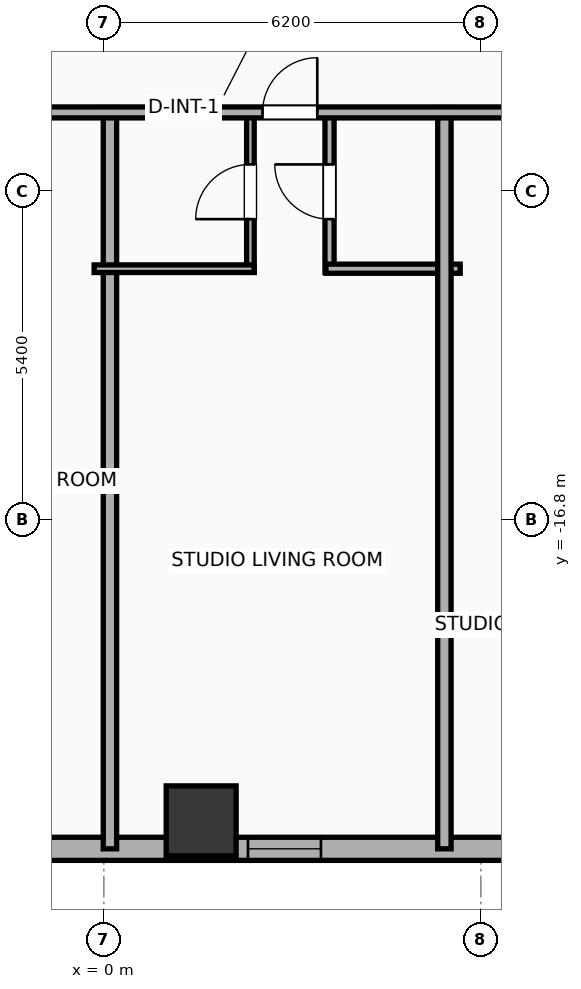
"""IFC4 building model, lengths in metres.
Left out: names, types, materials, properties, quantities, classifications, styles, units other than length and angle.
Written with IfcOpenShell. Run it as: python <this file> out.ifc"""

import sys

from ifc_helpers import new_model, si_unit, direction, frame, frame_2d, origin, origin_2d, place, context, subcontext, project, spatial, rectangle, hollow_rectangle, extrude, element, fill, save


model = new_model("IFC4")
c1 = context("Model", 3, precision=1e-05, world=origin(), true_north=direction((0.0, 1.0)))
c2 = subcontext(c1, "Body", "Model", "MODEL_VIEW")
j1 = project(units=[si_unit("LENGTHUNIT", "METRE"), si_unit("PLANEANGLEUNIT", "RADIAN")], contexts=[c1])
p1 = place(None, origin())
s1 = spatial("IfcSite", under=j1, at=p1, CompositionType="ELEMENT")
p2 = place(p1, origin())
s2 = spatial("IfcBuilding", under=s1, at=p2, CompositionType="ELEMENT")
p3 = place(p2, frame((0.0, 0.0, 41.6)))
s3 = spatial("IfcBuildingStorey", under=s2, at=p3, CompositionType="ELEMENT", Elevation=41.6)
p4 = place(p3, frame((1.6, -21.75, 0.0), z_axis=(0.0, 0.0, 1.0), x_axis=(1.0, 0.0, 0.0)))
e1 = element("IfcColumn", 1, at=p4, inside=s3, PredefinedType="COLUMN", context=c2, shape_type="SweptSolid", body=[
    extrude(hollow_rectangle(XDim=1.15, YDim=1.15, WallThickness=0.04, at=origin_2d()), origin(), (0.0, 0.0, 1.0), 3.9),
])
p5 = place(p3, frame((22.381, -22.21, 0.0), z_axis=(0.0, 0.0, 1.0), x_axis=(-1.0, 0.0, 0.0)))
e2 = element("IfcWall", 2, at=p5, inside=s3, PredefinedType="ELEMENTEDWALL", context=c2, shape_type="SweptSolid", body=[
    extrude(rectangle(XDim=51.963, YDim=0.38, at=frame_2d((25.981, 0.0))), origin(), (0.0, 0.0, 1.0), 3.65),
])
p6 = place(p5, frame((42.952, 0.0, 0.75)))
e3 = element("IfcOpeningElement", 3, at=p6, cuts=e2, PredefinedType="OPENING", context=c2, shape_type="SweptSolid", body=[
    extrude(rectangle(XDim=2.4, YDim=2.1, at=frame_2d((1.2, 1.05))), frame((0.0, 0.2, 0.0), z_axis=(0.0, -1.0, 0.0), x_axis=(1.0, 0.0, 0.0)), (0.0, 0.0, 1.0), 0.4),
])
p7 = place(p5, frame((49.847, 0.0, 0.75)))
e4 = element("IfcOpeningElement", 4, at=p7, cuts=e2, PredefinedType="OPENING", context=c2, shape_type="SweptSolid", body=[
    extrude(rectangle(XDim=1.2, YDim=2.05, at=frame_2d((0.6, 1.025))), frame((0.0, 0.2, 0.0), z_axis=(0.0, -1.0, 0.0), x_axis=(1.0, 0.0, 0.0)), (0.0, 0.0, 1.0), 0.4),
])
p8 = place(p5, frame((47.445, 0.0, 0.75)))
e5 = element("IfcOpeningElement", 5, at=p8, cuts=e2, PredefinedType="OPENING", context=c2, shape_type="SweptSolid", body=[
    extrude(rectangle(XDim=1.2, YDim=2.05, at=frame_2d((0.6, 1.025))), frame((0.0, 0.2, 0.0), z_axis=(0.0, -1.0, 0.0), x_axis=(1.0, 0.0, 0.0)), (0.0, 0.0, 1.0), 0.4),
])
p9 = place(p5, frame((39.526, 0.0, 0.75)))
e6 = element("IfcOpeningElement", 6, at=p9, cuts=e2, PredefinedType="OPENING", context=c2, shape_type="SweptSolid", body=[
    extrude(rectangle(XDim=1.2, YDim=2.05, at=frame_2d((0.6, 1.025))), frame((0.0, 0.2, 0.0), z_axis=(0.0, -1.0, 0.0), x_axis=(1.0, 0.0, 0.0)), (0.0, 0.0, 1.0), 0.4),
])
p10 = place(p5, frame((33.018, 0.0, 0.75)))
e7 = element("IfcOpeningElement", 7, at=p10, cuts=e2, PredefinedType="OPENING", context=c2, shape_type="SweptSolid", body=[
    extrude(rectangle(XDim=1.2, YDim=2.05, at=frame_2d((0.6, 1.025))), frame((0.0, 0.2, 0.0), z_axis=(0.0, -1.0, 0.0), x_axis=(1.0, 0.0, 0.0)), (0.0, 0.0, 1.0), 0.4),
])
p11 = place(p5, frame((36.813, 0.0, 0.75)))
e8 = element("IfcOpeningElement", 8, at=p11, cuts=e2, PredefinedType="OPENING", context=c2, shape_type="SweptSolid", body=[
    extrude(rectangle(XDim=1.2, YDim=2.05, at=frame_2d((0.6, 1.025))), frame((0.0, 0.2, 0.0), z_axis=(0.0, -1.0, 0.0), x_axis=(1.0, 0.0, 0.0)), (0.0, 0.0, 1.0), 0.4),
])
p12 = place(p5, frame((28.886, 0.0, 0.75)))
e9 = element("IfcOpeningElement", 9, at=p12, cuts=e2, PredefinedType="OPENING", context=c2, shape_type="SweptSolid", body=[
    extrude(rectangle(XDim=1.2, YDim=2.05, at=frame_2d((0.6, 1.025))), frame((0.0, 0.2, 0.0), z_axis=(0.0, -1.0, 0.0), x_axis=(1.0, 0.0, 0.0)), (0.0, 0.0, 1.0), 0.4),
])
p13 = place(p5, frame((23.306, 0.0, 0.75)))
e10 = element("IfcOpeningElement", 10, at=p13, cuts=e2, PredefinedType="OPENING", context=c2, shape_type="SweptSolid", body=[
    extrude(rectangle(XDim=1.2, YDim=2.05, at=frame_2d((0.6, 1.025))), frame((0.0, 0.2, 0.0), z_axis=(0.0, -1.0, 0.0), x_axis=(1.0, 0.0, 0.0)), (0.0, 0.0, 1.0), 0.4),
])
p14 = place(p5, frame((26.056, 0.0, 0.75)))
e11 = element("IfcOpeningElement", 11, at=p14, cuts=e2, PredefinedType="OPENING", context=c2, shape_type="SweptSolid", body=[
    extrude(rectangle(XDim=1.2, YDim=2.05, at=frame_2d((0.6, 1.025))), frame((0.0, 0.2, 0.0), z_axis=(0.0, -1.0, 0.0), x_axis=(1.0, 0.0, 0.0)), (0.0, 0.0, 1.0), 0.4),
])
p15 = place(p5, frame((18.811, 0.0, 0.75)))
e12 = element("IfcOpeningElement", 12, at=p15, cuts=e2, PredefinedType="OPENING", context=c2, shape_type="SweptSolid", body=[
    extrude(rectangle(XDim=1.2, YDim=2.05, at=frame_2d((0.6, 1.025))), frame((0.0, 0.2, 0.0), z_axis=(0.0, -1.0, 0.0), x_axis=(1.0, 0.0, 0.0)), (0.0, 0.0, 1.0), 0.4),
])
p16 = place(p5, frame((14.602, 0.0, 0.75)))
e13 = element("IfcOpeningElement", 13, at=p16, cuts=e2, PredefinedType="OPENING", context=c2, shape_type="SweptSolid", body=[
    extrude(rectangle(XDim=1.2, YDim=2.05, at=frame_2d((0.6, 1.025))), frame((0.0, 0.2, 0.0), z_axis=(0.0, -1.0, 0.0), x_axis=(1.0, 0.0, 0.0)), (0.0, 0.0, 1.0), 0.4),
])
p17 = place(p5, frame((11.852, 0.0, 0.75)))
e14 = element("IfcOpeningElement", 14, at=p17, cuts=e2, PredefinedType="OPENING", context=c2, shape_type="SweptSolid", body=[
    extrude(rectangle(XDim=1.2, YDim=2.05, at=frame_2d((0.6, 1.025))), frame((0.0, 0.2, 0.0), z_axis=(0.0, -1.0, 0.0), x_axis=(1.0, 0.0, 0.0)), (0.0, 0.0, 1.0), 0.4),
])
p18 = place(p5, frame((8.316, 0.0, 0.75)))
e15 = element("IfcOpeningElement", 15, at=p18, cuts=e2, PredefinedType="OPENING", context=c2, shape_type="SweptSolid", body=[
    extrude(rectangle(XDim=1.2, YDim=2.05, at=frame_2d((0.6, 1.025))), frame((0.0, 0.2, 0.0), z_axis=(0.0, -1.0, 0.0), x_axis=(1.0, 0.0, 0.0)), (0.0, 0.0, 1.0), 0.4),
])
p19 = place(p5, frame((6.286, 0.0, 0.75)))
e16 = element("IfcOpeningElement", 16, at=p19, cuts=e2, PredefinedType="OPENING", context=c2, shape_type="SweptSolid", body=[
    extrude(rectangle(XDim=1.2, YDim=2.05, at=frame_2d((0.6, 1.025))), frame((0.0, 0.2, 0.0), z_axis=(0.0, -1.0, 0.0), x_axis=(1.0, 0.0, 0.0)), (0.0, 0.0, 1.0), 0.4),
])
p20 = place(p5, frame((3.737, 0.0, 0.75)))
e17 = element("IfcOpeningElement", 17, at=p20, cuts=e2, PredefinedType="OPENING", context=c2, shape_type="SweptSolid", body=[
    extrude(rectangle(XDim=1.2, YDim=2.05, at=frame_2d((0.6, 1.025))), frame((0.0, 0.2, 0.0), z_axis=(0.0, -1.0, 0.0), x_axis=(1.0, 0.0, 0.0)), (0.0, 0.0, 1.0), 0.4),
])
p21 = place(p5, frame((1.291, 0.0, 0.75)))
e18 = element("IfcOpeningElement", 18, at=p21, cuts=e2, PredefinedType="OPENING", context=c2, shape_type="SweptSolid", body=[
    extrude(rectangle(XDim=1.2, YDim=2.05, at=frame_2d((0.6, 1.025))), frame((0.0, 0.2, 0.0), z_axis=(0.0, -1.0, 0.0), x_axis=(1.0, 0.0, 0.0)), (0.0, 0.0, 1.0), 0.4),
])
p22 = place(p3, frame((0.1, -22.21, 0.0), z_axis=(0.0, 0.0, 1.0), x_axis=(0.0, 1.0, 0.0)))
e19 = element("IfcWall", 19, at=p22, inside=s3, PredefinedType="PARTITIONING", context=c2, shape_type="SweptSolid", body=[
    extrude(rectangle(XDim=12.19, YDim=0.22, at=frame_2d((6.095, 0.0))), origin(), (0.0, 0.0, 1.0), 3.65),
])
p23 = place(p3, frame((2.41, -12.73, 0.0), z_axis=(0.0, 0.0, 1.0), x_axis=(0.0, 1.0, 0.0)))
e20 = element("IfcWall", 20, at=p23, inside=s3, PredefinedType="PARTITIONING", context=c2, shape_type="SweptSolid", body=[
    extrude(rectangle(XDim=2.65, YDim=0.125, at=frame_2d((1.325, 0.0))), origin(), (0.0, 0.0, 1.0), 3.65),
])
p24 = place(p23, frame((0.875, 0.0, 0.0)))
e21 = element("IfcOpeningElement", 21, at=p24, cuts=e20, PredefinedType="OPENING", context=c2, shape_type="SweptSolid", body=[
    extrude(rectangle(XDim=0.9, YDim=2.05, at=frame_2d((0.45, 1.025))), frame((0.0, 0.073, 0.0), z_axis=(0.0, -1.0, 0.0), x_axis=(1.0, 0.0, 0.0)), (0.0, 0.0, 1.0), 0.145),
])
p25 = place(p3, frame((3.711, -12.73, 0.0), z_axis=(0.0, 0.0, 1.0), x_axis=(0.0, 1.0, 0.0)))
e22 = element("IfcWall", 22, at=p25, inside=s3, PredefinedType="PLUMBINGWALL", context=c2, shape_type="SweptSolid", body=[
    extrude(rectangle(XDim=2.65, YDim=0.15, at=frame_2d((1.325, 0.0))), origin(), (0.0, 0.0, 1.0), 2.94),
])
p26 = place(p25, frame((0.875, 0.0, 0.0)))
e23 = element("IfcOpeningElement", 23, at=p26, cuts=e22, PredefinedType="OPENING", context=c2, shape_type="SweptSolid", body=[
    extrude(rectangle(XDim=0.9, YDim=2.05, at=frame_2d((0.45, 1.025))), frame((0.0, 0.085, 0.0), z_axis=(0.0, -1.0, 0.0), x_axis=(1.0, 0.0, 0.0)), (0.0, 0.0, 1.0), 0.17),
])
p27 = place(p3, frame((-0.16, -12.67, 0.0), z_axis=(0.0, 0.0, 1.0), x_axis=(1.0, 0.0, 0.0)))
e24 = element("IfcWall", 24, at=p27, inside=s3, PredefinedType="PARTITIONING", context=c2, shape_type="SweptSolid", body=[
    extrude(rectangle(XDim=2.63, YDim=0.125, at=frame_2d((1.315, 0.0))), origin(), (0.0, 0.0, 1.0), 3.65),
])
p28 = place(p3, frame((3.651, -12.67, 0.0), z_axis=(0.0, 0.0, 1.0), x_axis=(1.0, 0.0, 0.0)))
e25 = element("IfcWall", 25, at=p28, inside=s3, PredefinedType="PLUMBINGWALL", context=c2, shape_type="SweptSolid", body=[
    extrude(rectangle(XDim=2.209, YDim=0.15, at=frame_2d((1.104, 0.0))), origin(), (0.0, 0.0, 1.0), 3.65),
])
p29 = place(p3, frame((5.6, -22.21, 0.0), z_axis=(0.0, 0.0, 1.0), x_axis=(0.0, 1.0, 0.0)))
e26 = element("IfcWall", 26, at=p29, inside=s3, PredefinedType="PARTITIONING", context=c2, shape_type="SweptSolid", body=[
    extrude(rectangle(XDim=12.19, YDim=0.22, at=frame_2d((6.095, 0.0))), origin(), (0.0, 0.0, 1.0), 3.65),
])
p30 = place(p3, frame((-33.41, -10.1, 0.0), z_axis=(0.0, 0.0, 1.0), x_axis=(1.0, 0.0, 0.0)))
e27 = element("IfcWall", 27, at=p30, inside=s3, PredefinedType="PARTITIONING", context=c2, shape_type="SweptSolid", body=[
    extrude(rectangle(XDim=59.62, YDim=0.18, at=frame_2d((29.81, 0.0))), origin(), (0.0, 0.0, 1.0), 3.65),
])
p31 = place(p30, frame((2.746, 0.0, 0.0)))
e28 = element("IfcOpeningElement", 28, at=p31, cuts=e27, PredefinedType="OPENING", context=c2, shape_type="SweptSolid", body=[
    extrude(rectangle(XDim=0.9, YDim=2.05, at=frame_2d((0.45, 1.025))), frame((0.0, 0.1, 0.0), z_axis=(0.0, -1.0, 0.0), x_axis=(1.0, 0.0, 0.0)), (0.0, 0.0, 1.0), 0.2),
])
p32 = place(p30, frame((11.552, 0.0, 0.0)))
e29 = element("IfcOpeningElement", 29, at=p32, cuts=e27, PredefinedType="OPENING", context=c2, shape_type="SweptSolid", body=[
    extrude(rectangle(XDim=1.15, YDim=2.05, at=frame_2d((0.575, 1.025))), frame((0.0, 0.1, 0.0), z_axis=(0.0, -1.0, 0.0), x_axis=(1.0, 0.0, 0.0)), (0.0, 0.0, 1.0), 0.2),
])
p33 = place(p30, frame((22.379, 0.0, 0.0)))
e30 = element("IfcOpeningElement", 30, at=p33, cuts=e27, PredefinedType="OPENING", context=c2, shape_type="SweptSolid", body=[
    extrude(rectangle(XDim=1.15, YDim=2.05, at=frame_2d((0.575, 1.025))), frame((0.0, 0.1, 0.0), z_axis=(0.0, -1.0, 0.0), x_axis=(1.0, 0.0, 0.0)), (0.0, 0.0, 1.0), 0.2),
])
p34 = place(p30, frame((31.28, 0.0, 0.0)))
e31 = element("IfcOpeningElement", 31, at=p34, cuts=e27, PredefinedType="OPENING", context=c2, shape_type="SweptSolid", body=[
    extrude(rectangle(XDim=1.15, YDim=2.05, at=frame_2d((0.575, 1.025))), frame((0.0, 0.1, 0.0), z_axis=(0.0, -1.0, 0.0), x_axis=(1.0, 0.0, 0.0)), (0.0, 0.0, 1.0), 0.2),
])
p35 = place(p30, frame((36.02, 0.0, 0.0)))
e32 = element("IfcOpeningElement", 32, at=p35, cuts=e27, PredefinedType="OPENING", context=c2, shape_type="SweptSolid", body=[
    extrude(rectangle(XDim=0.9, YDim=2.05, at=frame_2d((0.45, 1.025))), frame((0.0, 0.1, 0.0), z_axis=(0.0, -1.0, 0.0), x_axis=(1.0, 0.0, 0.0)), (0.0, 0.0, 1.0), 0.2),
])
p36 = place(p30, frame((40.044, 0.0, 0.0)))
e33 = element("IfcOpeningElement", 33, at=p36, cuts=e27, PredefinedType="OPENING", context=c2, shape_type="SweptSolid", body=[
    extrude(rectangle(XDim=1.15, YDim=2.05, at=frame_2d((0.575, 1.025))), frame((0.0, 0.1, 0.0), z_axis=(0.0, -1.0, 0.0), x_axis=(1.0, 0.0, 0.0)), (0.0, 0.0, 1.0), 0.2),
])
p37 = place(p30, frame((45.613, 0.0, 0.0)))
e34 = element("IfcOpeningElement", 34, at=p37, cuts=e27, PredefinedType="OPENING", context=c2, shape_type="SweptSolid", body=[
    extrude(rectangle(XDim=1.15, YDim=2.05, at=frame_2d((0.575, 1.025))), frame((0.0, 0.1, 0.0), z_axis=(0.0, -1.0, 0.0), x_axis=(1.0, 0.0, 0.0)), (0.0, 0.0, 1.0), 0.2),
])
p38 = place(p30, frame((54.174, 0.0, 0.0)))
e35 = element("IfcOpeningElement", 35, at=p38, cuts=e27, PredefinedType="OPENING", context=c2, shape_type="SweptSolid", body=[
    extrude(rectangle(XDim=1.15, YDim=2.05, at=frame_2d((0.575, 1.025))), frame((0.0, 0.1, 0.0), z_axis=(0.0, -1.0, 0.0), x_axis=(1.0, 0.0, 0.0)), (0.0, 0.0, 1.0), 0.2),
])
p39 = place(p15, origin())
e36 = element("IfcWindow", 36, at=p39, inside=s3, PartitioningType="SINGLE_PANEL", PredefinedType="WINDOW", context=c2, shape_type="SweptSolid", body=[
    extrude(rectangle(XDim=1.2, YDim=2.05, at=frame_2d((0.6, 1.025))), frame((0.0, 0.03, 0.0), z_axis=(0.0, -1.0, 0.0), x_axis=(1.0, 0.0, 0.0)), (0.0, 0.0, 1.0), 0.06),
])
fill(e12, e36)
p40 = place(p24, origin())
e37 = element("IfcDoor", 37, at=p40, inside=s3, OperationType="SINGLE_SWING_LEFT", PredefinedType="DOOR", context=c2, shape_type="SweptSolid", body=[
    extrude(rectangle(XDim=0.9, YDim=2.05, at=frame_2d((0.45, 1.025))), frame((0.0, 0.025, 0.0), z_axis=(0.0, -1.0, 0.0), x_axis=(1.0, 0.0, 0.0)), (0.0, 0.0, 1.0), 0.05),
])
fill(e21, e37)
p41 = place(p26, origin())
e38 = element("IfcDoor", 38, at=p41, inside=s3, OperationType="SINGLE_SWING_RIGHT", PredefinedType="DOOR", context=c2, shape_type="SweptSolid", body=[
    extrude(rectangle(XDim=0.9, YDim=2.05, at=frame_2d((0.45, 1.025))), frame((0.0, 0.025, 0.0), z_axis=(0.0, -1.0, 0.0), x_axis=(1.0, 0.0, 0.0)), (0.0, 0.0, 1.0), 0.05),
])
fill(e23, e38)
p42 = place(p35, origin())
e39 = element("IfcDoor", 39, at=p42, inside=s3, OperationType="SINGLE_SWING_RIGHT", PredefinedType="DOOR", context=c2, shape_type="SweptSolid", body=[
    extrude(rectangle(XDim=0.9, YDim=2.05, at=frame_2d((0.45, 1.025))), frame((0.0, 0.025, 0.0), z_axis=(0.0, -1.0, 0.0), x_axis=(1.0, 0.0, 0.0)), (0.0, 0.0, 1.0), 0.05),
])
fill(e32, e39)
save(model, sys.argv[1])
